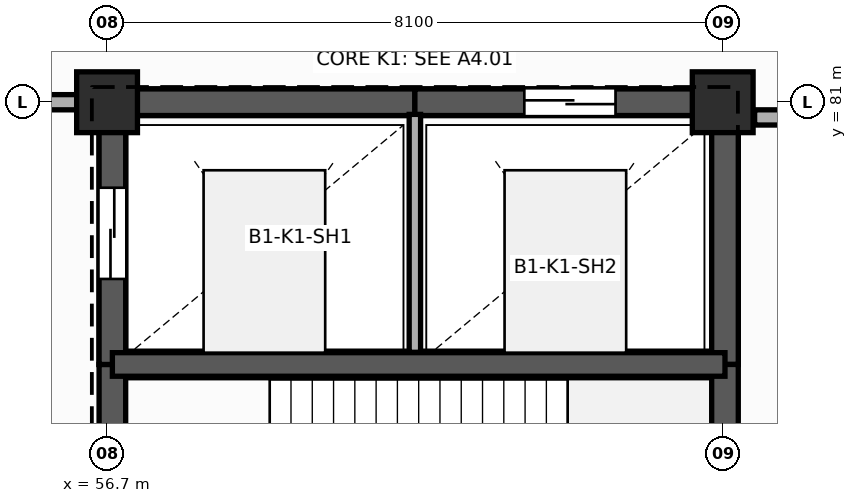
"""IFC4 building model, lengths in metres.
Left out: names, types, materials, properties, quantities, classifications, styles, units other than length and angle.
Written with IfcOpenShell. Run it as: python <this file> out.ifc"""

import sys

from ifc_helpers import new_model, si_unit, direction, frame, frame_2d, origin, origin_2d, place, context, subcontext, project, spatial, rectangle, extrude, element, fill, save


model = new_model("IFC4")
c1 = context("Model", 3, precision=1e-05, world=origin(), true_north=direction((0.0, 1.0)))
c2 = subcontext(c1, "Body", "Model", "MODEL_VIEW")
j1 = project(units=[si_unit("LENGTHUNIT", "METRE"), si_unit("PLANEANGLEUNIT", "RADIAN")], contexts=[c1])
p1 = place(None, origin())
s1 = spatial("IfcSite", under=j1, at=p1, CompositionType="ELEMENT")
p2 = place(p1, origin())
s2 = spatial("IfcBuilding", under=s1, at=p2, CompositionType="ELEMENT")
p3 = place(p2, frame((0.0, 0.0, -5.4)))
s3 = spatial("IfcBuildingStorey", under=s2, at=p3, CompositionType="ELEMENT", Elevation=-5.4)
for number, where, z_axis, x_axis in (
    (1, (56.7, 81.0, -0.4), (0.0, 0.0, 1.0), (1.0, 0.0, 0.0)),
    (2, (64.8, 81.0, -0.4), (0.0, 0.0, 1.0), (1.0, 0.0, 0.0)),
):
    element("IfcColumn", number, at=place(p3, frame(where, z_axis=z_axis, x_axis=x_axis)), inside=s3, PredefinedType="COLUMN", context=c2, shape_type="SweptSolid", body=[
        extrude(rectangle(XDim=0.8, YDim=0.8, at=origin_2d()), origin(), (0.0, 0.0, 1.0), 5.8),
    ])
p4 = place(p3, frame((56.77, 77.55, -1.35), z_axis=(0.0, 0.0, 1.0), x_axis=(1.0, 0.0, 0.0)))
e3 = element("IfcWall", 3, at=p4, inside=s3, PredefinedType="SHEAR", context=c2, shape_type="SweptSolid", body=[
    extrude(rectangle(XDim=8.06, YDim=0.35, at=frame_2d((4.03, 0.0))), origin(), (0.0, 0.0, 1.0), 0.95),
])
p5 = place(p3, frame((64.83, 77.55, -1.35), z_axis=(0.0, 0.0, 1.0), x_axis=(0.0, 1.0, 0.0)))
e4 = element("IfcWall", 4, at=p5, inside=s3, PredefinedType="SHEAR", context=c2, shape_type="SweptSolid", body=[
    extrude(rectangle(XDim=3.45, YDim=0.35, at=frame_2d((1.725, 0.0))), origin(), (0.0, 0.0, 1.0), 0.95),
])
p6 = place(p3, frame((64.83, 81.0, -1.35), z_axis=(0.0, 0.0, 1.0), x_axis=(-1.0, 0.0, 0.0)))
e5 = element("IfcWall", 5, at=p6, inside=s3, PredefinedType="SHEAR", context=c2, shape_type="SweptSolid", body=[
    extrude(rectangle(XDim=8.06, YDim=0.35, at=frame_2d((4.03, 0.0))), origin(), (0.0, 0.0, 1.0), 0.95),
])
p7 = place(p3, frame((56.77, 81.0, -1.35), z_axis=(0.0, 0.0, 1.0), x_axis=(0.0, -1.0, 0.0)))
e6 = element("IfcWall", 6, at=p7, inside=s3, PredefinedType="SHEAR", context=c2, shape_type="SweptSolid", body=[
    extrude(rectangle(XDim=3.45, YDim=0.35, at=frame_2d((1.725, 0.0))), origin(), (0.0, 0.0, 1.0), 0.95),
])
p8 = place(p3, frame((56.77, 73.13, -0.4), z_axis=(0.0, 0.0, 1.0), x_axis=(0.0, 1.0, 0.0)))
e7 = element("IfcWall", 7, at=p8, inside=s3, PredefinedType="SHEAR", context=c2, shape_type="SweptSolid", body=[
    extrude(rectangle(XDim=4.42, YDim=0.35, at=frame_2d((2.21, 0.0))), origin(), (0.0, 0.0, 1.0), 5.8),
])
p9 = place(p8, frame((1.35, 0.0, 0.4)))
e8 = element("IfcOpeningElement", 8, at=p9, cuts=e7, PredefinedType="OPENING", context=c2, shape_type="SweptSolid", body=[
    extrude(rectangle(XDim=1.2, YDim=2.25, at=frame_2d((0.6, 1.125))), frame((0.0, 0.185, 0.0), z_axis=(0.0, -1.0, 0.0), x_axis=(1.0, 0.0, 0.0)), (0.0, 0.0, 1.0), 0.37),
])
p10 = place(p3, frame((56.77, 77.55, -0.4), z_axis=(0.0, 0.0, 1.0), x_axis=(0.0, 1.0, 0.0)))
e9 = element("IfcWall", 9, at=p10, inside=s3, PredefinedType="SHEAR", context=c2, shape_type="SweptSolid", body=[
    extrude(rectangle(XDim=3.45, YDim=0.35, at=frame_2d((1.725, 0.0))), origin(), (0.0, 0.0, 1.0), 5.8),
])
p11 = place(p10, frame((1.125, 0.0, 0.4)))
e10 = element("IfcOpeningElement", 10, at=p11, cuts=e9, PredefinedType="OPENING", context=c2, shape_type="SweptSolid", body=[
    extrude(rectangle(XDim=1.2, YDim=2.2, at=frame_2d((0.6, 1.1))), frame((0.0, 0.185, 0.0), z_axis=(0.0, -1.0, 0.0), x_axis=(1.0, 0.0, 0.0)), (0.0, 0.0, 1.0), 0.37),
])
p12 = place(p3, frame((56.77, 81.0, -0.4), z_axis=(0.0, 0.0, 1.0), x_axis=(1.0, 0.0, 0.0)))
e11 = element("IfcWall", 11, at=p12, inside=s3, PredefinedType="SHEAR", context=c2, shape_type="SweptSolid", body=[
    extrude(rectangle(XDim=3.98, YDim=0.35, at=frame_2d((1.99, 0.0))), origin(), (0.0, 0.0, 1.0), 5.8),
])
p13 = place(p3, frame((60.75, 81.0, -0.4), z_axis=(0.0, 0.0, 1.0), x_axis=(1.0, 0.0, 0.0)))
e12 = element("IfcWall", 12, at=p13, inside=s3, PredefinedType="SHEAR", context=c2, shape_type="SweptSolid", body=[
    extrude(rectangle(XDim=4.08, YDim=0.35, at=frame_2d((2.04, 0.0))), origin(), (0.0, 0.0, 1.0), 5.8),
])
p14 = place(p13, frame((1.44, 0.0, 0.4)))
e13 = element("IfcOpeningElement", 13, at=p14, cuts=e12, PredefinedType="OPENING", context=c2, shape_type="SweptSolid", body=[
    extrude(rectangle(XDim=1.2, YDim=2.2, at=frame_2d((0.6, 1.1))), frame((0.0, 0.185, 0.0), z_axis=(0.0, -1.0, 0.0), x_axis=(1.0, 0.0, 0.0)), (0.0, 0.0, 1.0), 0.37),
])
p15 = place(p3, frame((64.83, 81.0, -0.4), z_axis=(0.0, 0.0, 1.0), x_axis=(0.0, -1.0, 0.0)))
e14 = element("IfcWall", 14, at=p15, inside=s3, PredefinedType="SHEAR", context=c2, shape_type="SweptSolid", body=[
    extrude(rectangle(XDim=3.45, YDim=0.35, at=frame_2d((1.725, 0.0))), origin(), (0.0, 0.0, 1.0), 5.8),
])
p16 = place(p3, frame((64.83, 77.55, -0.4), z_axis=(0.0, 0.0, 1.0), x_axis=(0.0, -1.0, 0.0)))
e15 = element("IfcWall", 15, at=p16, inside=s3, PredefinedType="SHEAR", context=c2, shape_type="SweptSolid", body=[
    extrude(rectangle(XDim=4.42, YDim=0.35, at=frame_2d((2.21, 0.0))), origin(), (0.0, 0.0, 1.0), 5.8),
])
p17 = place(p3, frame((56.77, 77.55, -0.4), z_axis=(0.0, 0.0, 1.0), x_axis=(1.0, 0.0, 0.0)))
e16 = element("IfcWall", 16, at=p17, inside=s3, PredefinedType="SHEAR", context=c2, shape_type="SweptSolid", body=[
    extrude(rectangle(XDim=8.06, YDim=0.31, at=frame_2d((4.03, 0.0))), origin(), (0.0, 0.0, 1.0), 5.8),
])
p18 = place(p3, frame((60.75, 77.71, 0.0), z_axis=(0.0, 0.0, 1.0), x_axis=(0.0, 1.0, 0.0)))
e17 = element("IfcWall", 17, at=p18, inside=s3, PredefinedType="PLUMBINGWALL", context=c2, shape_type="SweptSolid", body=[
    extrude(rectangle(XDim=3.13, YDim=0.15, at=frame_2d((1.565, 0.0))), origin(), (0.0, 0.0, 1.0), 5.05),
])
p19 = place(p3, frame((51.3, 81.0, 0.0), z_axis=(0.0, 0.0, 1.0), x_axis=(1.0, 0.0, 0.0)))
e18 = element("IfcWall", 18, at=p19, inside=s3, PredefinedType="PARTITIONING", context=c2, shape_type="SweptSolid", body=[
    extrude(rectangle(XDim=5.0, YDim=0.2, at=frame_2d((2.5, 0.0))), origin(), (0.0, 0.0, 1.0), 4.591),
])
p20 = place(p3, frame((65.22, 80.8, 0.0), z_axis=(0.0, 0.0, 1.0), x_axis=(1.0, 0.0, 0.0)))
e19 = element("IfcWall", 19, at=p20, inside=s3, PredefinedType="PARTITIONING", context=c2, shape_type="SweptSolid", body=[
    extrude(rectangle(XDim=7.26, YDim=0.2, at=frame_2d((3.63, 0.0))), origin(), (0.0, 0.0, 1.0), 4.324),
])
p21 = place(p11, origin())
e20 = element("IfcDoor", 20, at=p21, inside=s3, OperationType="SLIDING_TO_LEFT", PredefinedType="DOOR", context=c2, shape_type="SweptSolid", body=[
    extrude(rectangle(XDim=1.2, YDim=2.2, at=frame_2d((0.6, 1.1))), frame((0.0, 0.025, 0.0), z_axis=(0.0, -1.0, 0.0), x_axis=(1.0, 0.0, 0.0)), (0.0, 0.0, 1.0), 0.05),
])
fill(e10, e20)
p22 = place(p14, origin())
e21 = element("IfcDoor", 21, at=p22, inside=s3, OperationType="SLIDING_TO_LEFT", PredefinedType="DOOR", context=c2, shape_type="SweptSolid", body=[
    extrude(rectangle(XDim=1.2, YDim=2.2, at=frame_2d((0.6, 1.1))), frame((0.0, 0.025, 0.0), z_axis=(0.0, -1.0, 0.0), x_axis=(1.0, 0.0, 0.0)), (0.0, 0.0, 1.0), 0.05),
])
fill(e13, e21)
save(model, sys.argv[1])
